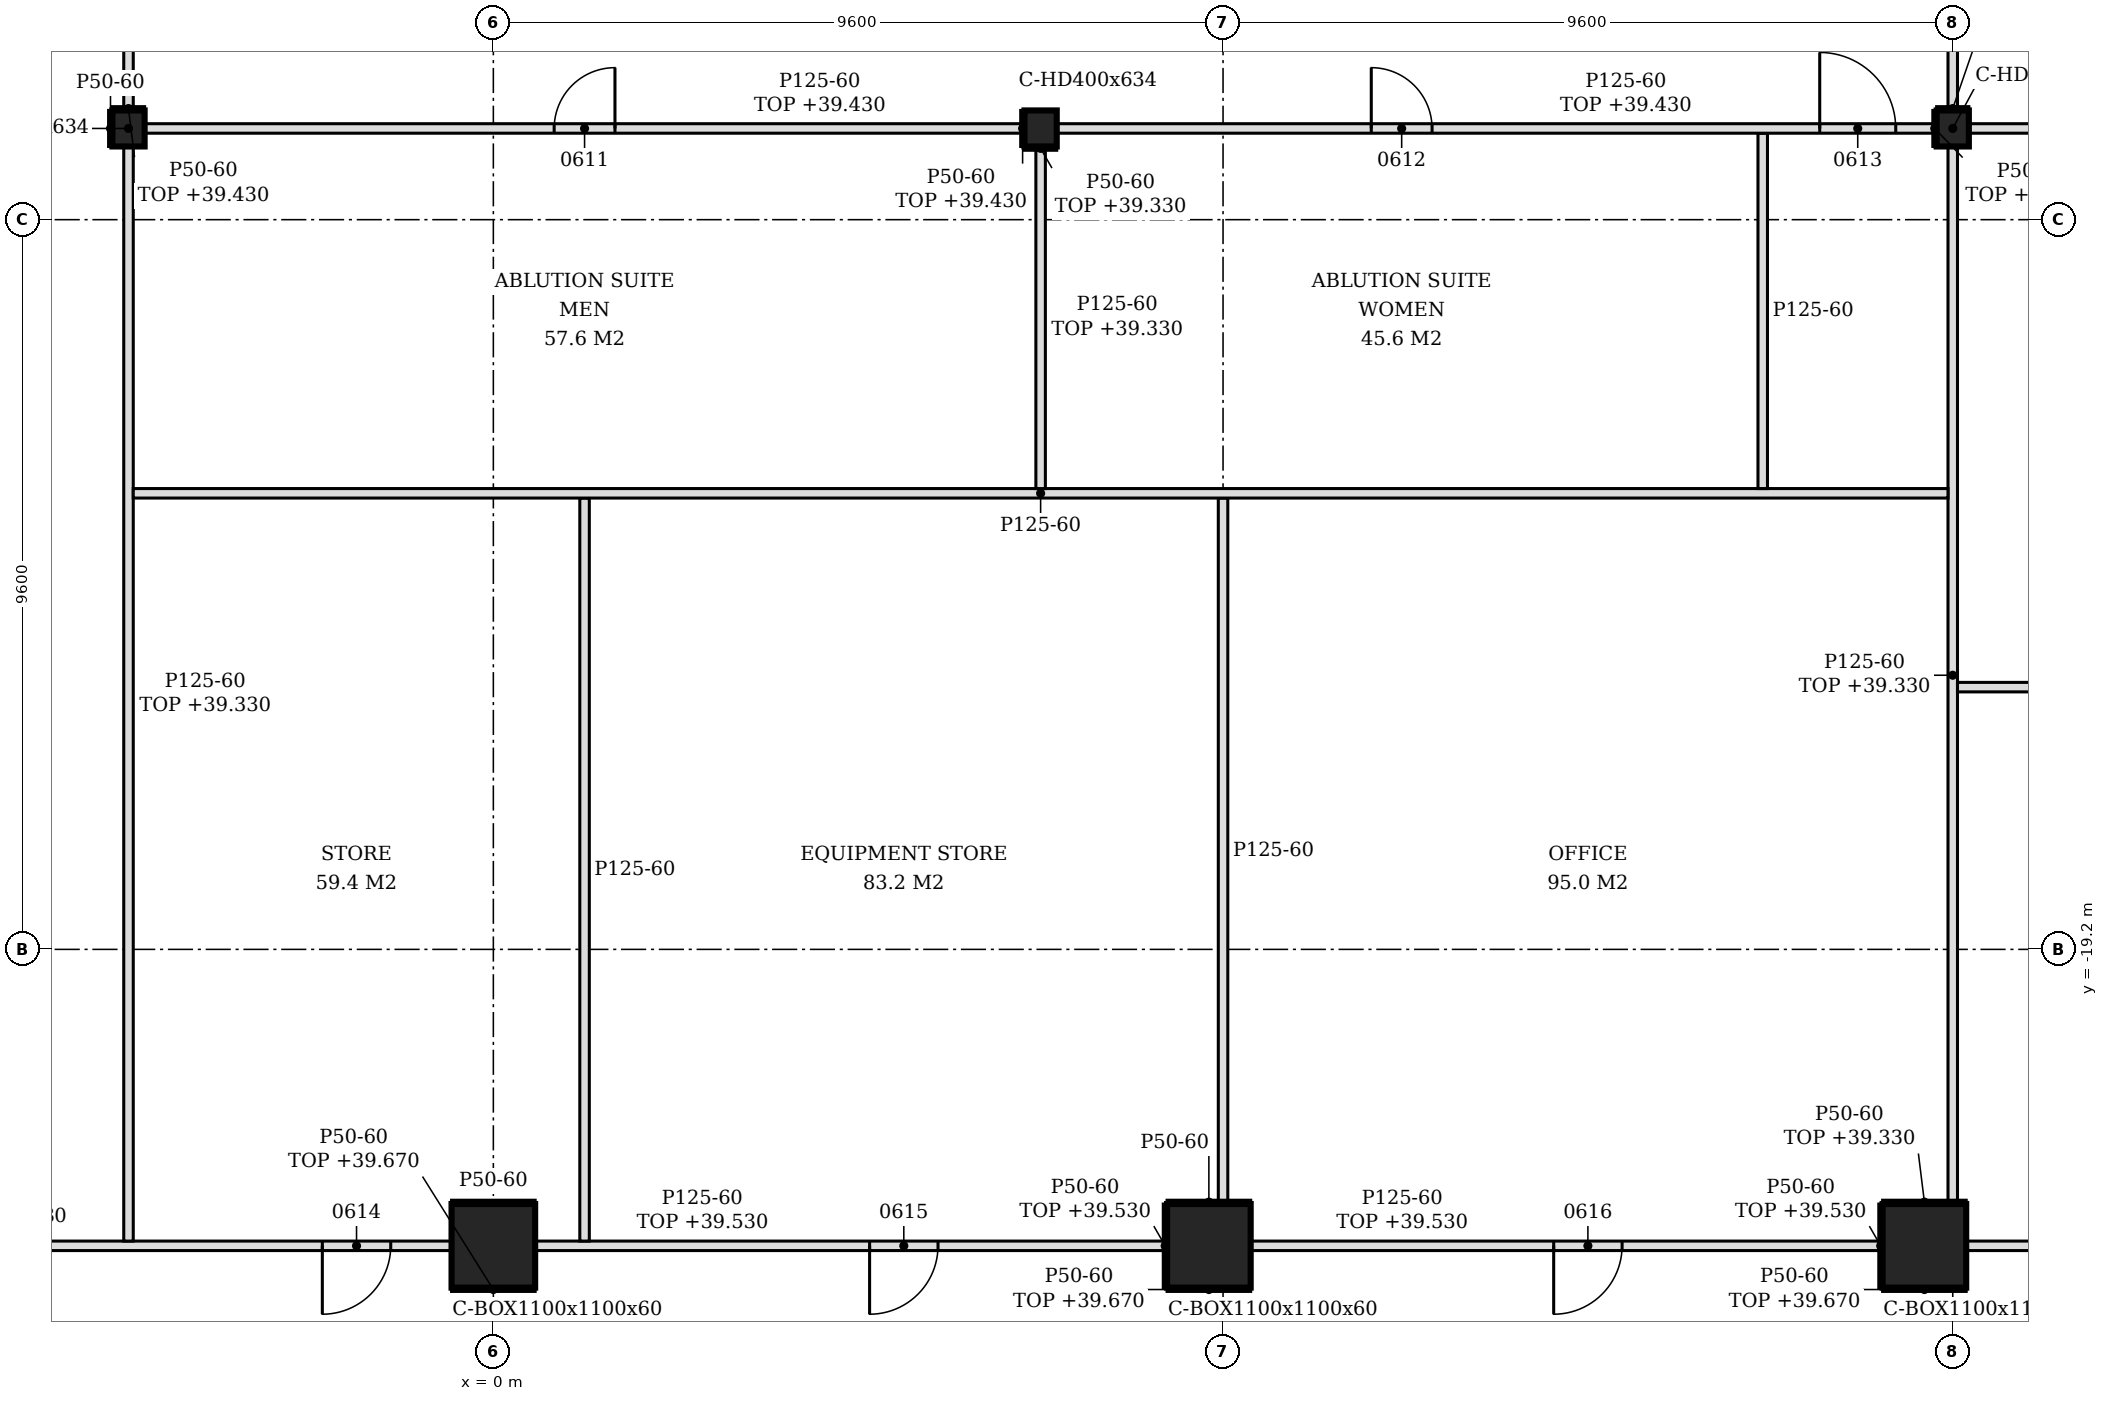
"""IFC4 building model, lengths in metres.
Left out: names, types, materials, properties, quantities, classifications, styles, units other than length and angle.
Written with IfcOpenShell. Run it as: python <this file> out.ifc"""

import sys

from ifc_helpers import new_model, si_unit, direction, frame, frame_2d, origin, origin_2d, place, context, subcontext, project, spatial, polyline, rectangle, hollow_rectangle, i_section, outline, extrude, element, fill, save


model = new_model("IFC4")
c1 = context("Model", 3, precision=1e-05, world=origin(), true_north=direction((0.0, 1.0)))
c2 = subcontext(c1, "Body", "Model", "MODEL_VIEW")
j1 = project(units=[si_unit("LENGTHUNIT", "METRE"), si_unit("PLANEANGLEUNIT", "RADIAN")], contexts=[c1])
p1 = place(None, origin())
s1 = spatial("IfcSite", under=j1, at=p1, CompositionType="ELEMENT")
p2 = place(p1, origin())
s2 = spatial("IfcBuilding", under=s1, at=p2, CompositionType="ELEMENT")
p3 = place(p2, frame((0.0, 0.0, 35.4)))
s3 = spatial("IfcBuildingStorey", under=s2, at=p3, CompositionType="ELEMENT", Elevation=35.4)
for number, where, z_axis, x_axis in (
    (1, (0.0, -23.1, -0.2), (0.0, 0.0, 1.0), (1.0, 0.0, 0.0)),
    (2, (9.414, -23.1, -0.2), (0.0, 0.0, 1.0), (1.0, 0.0, 0.0)),
    (3, (18.827, -23.1, -0.2), (0.0, 0.0, 1.0), (1.0, 0.0, 0.0)),
):
    element("IfcColumn", number, at=place(p3, frame(where, z_axis=z_axis, x_axis=x_axis)), inside=s3, PredefinedType="COLUMN", context=c2, shape_type="SweptSolid", body=[
        extrude(hollow_rectangle(XDim=1.1, YDim=1.1, WallThickness=0.06, at=origin_2d()), origin(), (0.0, 0.0, 1.0), 4.85),
    ])
for number, where, z_axis, x_axis in (
    (4, (-4.8, -8.4, -0.2), (0.0, 0.0, 1.0), (1.0, 0.0, 0.0)),
    (5, (7.2, -8.4, -0.2), (0.0, 0.0, 1.0), (1.0, 0.0, 0.0)),
    (6, (19.2, -8.4, -0.2), (0.0, 0.0, 1.0), (1.0, 0.0, 0.0)),
):
    element("IfcColumn", number, at=place(p3, frame(where, z_axis=z_axis, x_axis=x_axis)), inside=s3, PredefinedType="COLUMN", context=c2, shape_type="SweptSolid", body=[
        extrude(i_section(OverallWidth=0.424, OverallDepth=0.474, WebThickness=0.048, FlangeThickness=0.077, FilletRadius=0.015, at=origin_2d()), origin(), (0.0, 0.0, 1.0), 4.85),
    ])
p4 = place(p3, frame((-8.864, -23.1, 0.0), z_axis=(0.0, 0.0, 1.0), x_axis=(1.0, 0.0, 0.0)))
e7 = element("IfcWall", 7, at=p4, inside=s3, PredefinedType="PARTITIONING", context=c2, shape_type="SweptSolid", body=[
    extrude(rectangle(XDim=8.313, YDim=0.125, at=frame_2d((4.157, 0.0))), origin(), (0.0, 0.0, 1.0), 4.13),
])
p5 = place(p4, frame((6.614, 0.0, 0.0)))
e8 = element("IfcOpeningElement", 8, at=p5, cuts=e7, PredefinedType="OPENING", context=c2, shape_type="SweptSolid", body=[
    extrude(rectangle(XDim=0.9, YDim=2.1, at=frame_2d((0.45, 1.05))), frame((0.0, 0.073, 0.0), z_axis=(0.0, -1.0, 0.0), x_axis=(1.0, 0.0, 0.0)), (0.0, 0.0, 1.0), 0.145),
])
p6 = place(p3, frame((0.55, -23.1, 0.0), z_axis=(0.0, 0.0, 1.0), x_axis=(1.0, 0.0, 0.0)))
e9 = element("IfcWall", 9, at=p6, inside=s3, PredefinedType="PARTITIONING", context=c2, shape_type="SweptSolid", body=[
    extrude(rectangle(XDim=8.313, YDim=0.125, at=frame_2d((4.157, 0.0))), origin(), (0.0, 0.0, 1.0), 4.13),
])
p7 = place(p6, frame((4.4, 0.0, 0.0)))
e10 = element("IfcOpeningElement", 10, at=p7, cuts=e9, PredefinedType="OPENING", context=c2, shape_type="SweptSolid", body=[
    extrude(rectangle(XDim=0.9, YDim=2.1, at=frame_2d((0.45, 1.05))), frame((0.0, 0.073, 0.0), z_axis=(0.0, -1.0, 0.0), x_axis=(1.0, 0.0, 0.0)), (0.0, 0.0, 1.0), 0.145),
])
p8 = place(p3, frame((9.964, -23.1, 0.0), z_axis=(0.0, 0.0, 1.0), x_axis=(1.0, 0.0, 0.0)))
e11 = element("IfcWall", 11, at=p8, inside=s3, PredefinedType="PARTITIONING", context=c2, shape_type="SweptSolid", body=[
    extrude(rectangle(XDim=8.313, YDim=0.125, at=frame_2d((4.157, 0.0))), origin(), (0.0, 0.0, 1.0), 4.13),
])
p9 = place(p8, frame((3.986, 0.0, 0.0)))
e12 = element("IfcOpeningElement", 12, at=p9, cuts=e11, PredefinedType="OPENING", context=c2, shape_type="SweptSolid", body=[
    extrude(rectangle(XDim=0.9, YDim=2.1, at=frame_2d((0.45, 1.05))), frame((0.0, 0.073, 0.0), z_axis=(0.0, -1.0, 0.0), x_axis=(1.0, 0.0, 0.0)), (0.0, 0.0, 1.0), 0.145),
])
p10 = place(p3, frame((19.377, -23.1, 0.0), z_axis=(0.0, 0.0, 1.0), x_axis=(1.0, 0.0, 0.0)))
e13 = element("IfcWall", 13, at=p10, inside=s3, PredefinedType="PARTITIONING", context=c2, shape_type="SweptSolid", body=[
    extrude(rectangle(XDim=8.585, YDim=0.125, at=frame_2d((4.292, 0.0))), origin(), (0.0, 0.0, 1.0), 4.65),
])
p11 = place(p3, frame((-4.8, -23.038, 0.0), z_axis=(0.0, 0.0, 1.0), x_axis=(0.0, 1.0, 0.0)))
e14 = element("IfcWall", 14, at=p11, inside=s3, PredefinedType="PARTITIONING", context=c2, shape_type="SweptSolid", body=[
    extrude(rectangle(XDim=14.401, YDim=0.125, at=frame_2d((7.2, 0.0))), origin(), (0.0, 0.0, 1.0), 3.93),
])
p12 = place(p3, frame((1.2, -23.038, 0.0), z_axis=(0.0, 0.0, 1.0), x_axis=(0.0, 1.0, 0.0)))
e15 = element("IfcWall", 15, at=p12, inside=s3, PredefinedType="PARTITIONING", context=c2, shape_type="SweptSolid", body=[
    extrude(outline(polyline([(0.0, 0.0), (9.775, 0.0), (9.775, 4.65), (8.742, 4.65), (8.74, 4.08), (8.532, 4.08), (8.531, 4.65), (3.942, 4.65), (3.94, 4.08), (3.732, 4.08), (3.73, 4.65), (0.087, 4.65), (0.085, 4.13), (0.0, 4.13), (0.0, 0.0)])), frame((0.0, 0.062, 0.0), z_axis=(0.0, -1.0, 0.0), x_axis=(1.0, 0.0, 0.0)), (0.0, 0.0, 1.0), 0.125),
])
p13 = place(p3, frame((9.6, -22.55, 0.0), z_axis=(0.0, 0.0, 1.0), x_axis=(0.0, 1.0, 0.0)))
e16 = element("IfcWall", 16, at=p13, inside=s3, PredefinedType="PARTITIONING", context=c2, shape_type="SweptSolid", body=[
    extrude(outline(polyline([(0.0, 0.0), (9.288, 0.0), (9.288, 4.65), (8.255, 4.65), (8.253, 4.08), (8.045, 4.08), (8.043, 4.65), (3.455, 4.65), (3.453, 4.08), (3.245, 4.08), (3.243, 4.65), (0.0, 4.65), (0.0, 0.0)])), frame((0.0, 0.062, 0.0), z_axis=(0.0, -1.0, 0.0), x_axis=(1.0, 0.0, 0.0)), (0.0, 0.0, 1.0), 0.125),
])
p14 = place(p3, frame((19.2, -22.55, 0.0), z_axis=(0.0, 0.0, 1.0), x_axis=(0.0, 1.0, 0.0)))
e17 = element("IfcWall", 17, at=p14, inside=s3, PredefinedType="PARTITIONING", context=c2, shape_type="SweptSolid", body=[
    extrude(rectangle(XDim=13.913, YDim=0.125, at=frame_2d((6.957, 0.0))), origin(), (0.0, 0.0, 1.0), 3.93),
])
p15 = place(p3, frame((19.262, -15.75, 0.0), z_axis=(0.0, 0.0, 1.0), x_axis=(1.0, 0.0, 0.0)))
e18 = element("IfcWall", 18, at=p15, inside=s3, PredefinedType="PARTITIONING", context=c2, shape_type="SweptSolid", body=[
    extrude(outline(polyline([(0.0, 0.0), (8.575, 0.0), (8.575, 4.65), (7.189, 4.65), (7.187, 4.13), (6.64, 4.13), (6.638, 4.65), (0.087, 4.65), (0.085, 3.93), (0.0, 3.93), (0.0, 0.0)])), frame((0.0, 0.062, 0.0), z_axis=(0.0, -1.0, 0.0), x_axis=(1.0, 0.0, 0.0)), (0.0, 0.0, 1.0), 0.125),
])
p16 = place(p3, frame((-4.738, -13.2, 0.0), z_axis=(0.0, 0.0, 1.0), x_axis=(1.0, 0.0, 0.0)))
e19 = element("IfcWall", 19, at=p16, inside=s3, PredefinedType="PARTITIONING", context=c2, shape_type="SweptSolid", body=[
    extrude(outline(polyline([(0.0, 0.0), (23.875, 0.0), (23.875, 3.93), (23.788, 3.93), (23.785, 4.65), (12.087, 4.65), (12.085, 3.93), (11.788, 3.93), (11.785, 4.65), (0.087, 4.65), (0.085, 3.93), (0.0, 3.93), (0.0, 0.0)])), frame((0.0, 0.062, 0.0), z_axis=(0.0, -1.0, 0.0), x_axis=(1.0, 0.0, 0.0)), (0.0, 0.0, 1.0), 0.125),
])
p17 = place(p3, frame((7.2, -13.137, 0.0), z_axis=(0.0, 0.0, 1.0), x_axis=(0.0, 1.0, 0.0)))
e20 = element("IfcWall", 20, at=p17, inside=s3, PredefinedType="PARTITIONING", context=c2, shape_type="SweptSolid", body=[
    extrude(rectangle(XDim=4.5, YDim=0.125, at=frame_2d((2.25, 0.0))), origin(), (0.0, 0.0, 1.0), 3.93),
])
p18 = place(p3, frame((16.7, -13.137, 0.0), z_axis=(0.0, 0.0, 1.0), x_axis=(0.0, 1.0, 0.0)))
e21 = element("IfcWall", 21, at=p18, inside=s3, PredefinedType="PARTITIONING", context=c2, shape_type="SweptSolid", body=[
    extrude(outline(polyline([(0.0, 0.0), (4.675, 0.0), (4.675, 4.03), (4.587, 4.03), (4.585, 4.65), (0.0, 4.65), (0.0, 0.0)])), frame((0.0, 0.062, 0.0), z_axis=(0.0, -1.0, 0.0), x_axis=(1.0, 0.0, 0.0)), (0.0, 0.0, 1.0), 0.125),
])
p19 = place(p3, frame((-4.588, -8.4, 0.0), z_axis=(0.0, 0.0, 1.0), x_axis=(1.0, 0.0, 0.0)))
e22 = element("IfcWall", 22, at=p19, inside=s3, PredefinedType="PARTITIONING", context=c2, shape_type="SweptSolid", body=[
    extrude(rectangle(XDim=11.576, YDim=0.125, at=frame_2d((5.788, 0.0))), origin(), (0.0, 0.0, 1.0), 4.03),
])
p20 = place(p19, frame((5.388, 0.0, 0.0)))
e23 = element("IfcOpeningElement", 23, at=p20, cuts=e22, PredefinedType="OPENING", context=c2, shape_type="SweptSolid", body=[
    extrude(rectangle(XDim=0.8, YDim=2.1, at=frame_2d((0.4, 1.05))), frame((0.0, 0.073, 0.0), z_axis=(0.0, -1.0, 0.0), x_axis=(1.0, 0.0, 0.0)), (0.0, 0.0, 1.0), 0.145),
])
p21 = place(p3, frame((7.412, -8.4, 0.0), z_axis=(0.0, 0.0, 1.0), x_axis=(1.0, 0.0, 0.0)))
e24 = element("IfcWall", 24, at=p21, inside=s3, PredefinedType="PARTITIONING", context=c2, shape_type="SweptSolid", body=[
    extrude(rectangle(XDim=11.576, YDim=0.125, at=frame_2d((5.788, 0.0))), origin(), (0.0, 0.0, 1.0), 4.03),
])
p22 = place(p21, frame((4.138, 0.0, 0.0)))
e25 = element("IfcOpeningElement", 25, at=p22, cuts=e24, PredefinedType="OPENING", context=c2, shape_type="SweptSolid", body=[
    extrude(rectangle(XDim=0.8, YDim=2.1, at=frame_2d((0.4, 1.05))), frame((0.0, 0.073, 0.0), z_axis=(0.0, -1.0, 0.0), x_axis=(1.0, 0.0, 0.0)), (0.0, 0.0, 1.0), 0.145),
])
p23 = place(p21, frame((10.038, 0.0, 0.0)))
e26 = element("IfcOpeningElement", 26, at=p23, cuts=e24, PredefinedType="OPENING", context=c2, shape_type="SweptSolid", body=[
    extrude(rectangle(XDim=1.0, YDim=2.1, at=frame_2d((0.5, 1.05))), frame((0.0, 0.073, 0.0), z_axis=(0.0, -1.0, 0.0), x_axis=(1.0, 0.0, 0.0)), (0.0, 0.0, 1.0), 0.145),
])
p24 = place(p3, frame((19.412, -8.4, 0.0), z_axis=(0.0, 0.0, 1.0), x_axis=(1.0, 0.0, 0.0)))
e27 = element("IfcWall", 27, at=p24, inside=s3, PredefinedType="PARTITIONING", context=c2, shape_type="SweptSolid", body=[
    extrude(outline(polyline([(0.0, 0.0), (8.425, 0.0), (8.426, 4.13), (8.338, 4.13), (8.336, 4.65), (0.0, 4.65), (0.0, 0.0)])), frame((0.0, 0.062, 0.0), z_axis=(0.0, -1.0, 0.0), x_axis=(1.0, 0.0, 0.0)), (0.0, 0.0, 1.0), 0.125),
])
for number, where, z_axis, x_axis in (
    (28, (-4.8, -8.163, 0.0), (0.0, 0.0, 1.0), (0.0, 1.0, 0.0)),
    (29, (19.2, -8.163, 0.0), (0.0, 0.0, 1.0), (0.0, 1.0, 0.0)),
):
    element("IfcWall", number, at=place(p3, frame(where, z_axis=z_axis, x_axis=x_axis)), inside=s3, PredefinedType="PARTITIONING", context=c2, shape_type="SweptSolid", body=[
        extrude(rectangle(XDim=10.326, YDim=0.125, at=frame_2d((5.163, 0.0))), origin(), (0.0, 0.0, 1.0), 4.03),
    ])
p25 = place(p3, frame((-0.55, -22.525, 0.0), z_axis=(0.0, 0.0, 1.0), x_axis=(1.0, 0.0, 0.0)))
e30 = element("IfcWall", 30, at=p25, inside=s3, PredefinedType="PARTITIONING", context=c2, shape_type="SweptSolid", body=[
    extrude(rectangle(XDim=1.1, YDim=0.05, at=frame_2d((0.55, 0.0))), origin(), (0.0, 0.0, 1.0), 4.65),
])
p26 = place(p3, frame((-0.55, -23.675, 0.0), z_axis=(0.0, 0.0, 1.0), x_axis=(1.0, 0.0, 0.0)))
e31 = element("IfcWall", 31, at=p26, inside=s3, PredefinedType="PARTITIONING", context=c2, shape_type="SweptSolid", body=[
    extrude(rectangle(XDim=1.1, YDim=0.05, at=frame_2d((0.55, 0.0))), origin(), (0.0, 0.0, 1.0), 4.27),
])
p27 = place(p3, frame((8.864, -22.525, 0.0), z_axis=(0.0, 0.0, 1.0), x_axis=(1.0, 0.0, 0.0)))
e32 = element("IfcWall", 32, at=p27, inside=s3, PredefinedType="PARTITIONING", context=c2, shape_type="SweptSolid", body=[
    extrude(rectangle(XDim=1.1, YDim=0.05, at=frame_2d((0.55, 0.0))), origin(), (0.0, 0.0, 1.0), 4.65),
])
p28 = place(p3, frame((8.864, -23.675, 0.0), z_axis=(0.0, 0.0, 1.0), x_axis=(1.0, 0.0, 0.0)))
e33 = element("IfcWall", 33, at=p28, inside=s3, PredefinedType="PARTITIONING", context=c2, shape_type="SweptSolid", body=[
    extrude(rectangle(XDim=1.1, YDim=0.05, at=frame_2d((0.55, 0.0))), origin(), (0.0, 0.0, 1.0), 4.27),
])
p29 = place(p3, frame((18.277, -22.525, 0.0), z_axis=(0.0, 0.0, 1.0), x_axis=(1.0, 0.0, 0.0)))
e34 = element("IfcWall", 34, at=p29, inside=s3, PredefinedType="PARTITIONING", context=c2, shape_type="SweptSolid", body=[
    extrude(rectangle(XDim=1.1, YDim=0.05, at=frame_2d((0.55, 0.0))), origin(), (0.0, 0.0, 1.0), 3.93),
])
p30 = place(p3, frame((18.277, -23.675, 0.0), z_axis=(0.0, 0.0, 1.0), x_axis=(1.0, 0.0, 0.0)))
e35 = element("IfcWall", 35, at=p30, inside=s3, PredefinedType="PARTITIONING", context=c2, shape_type="SweptSolid", body=[
    extrude(rectangle(XDim=1.1, YDim=0.05, at=frame_2d((0.55, 0.0))), origin(), (0.0, 0.0, 1.0), 4.27),
])
p31 = place(p3, frame((-5.037, -8.637, 0.0), z_axis=(0.0, 0.0, 1.0), x_axis=(0.0, 1.0, 0.0)))
e36 = element("IfcWall", 36, at=p31, inside=s3, PredefinedType="PARTITIONING", context=c2, shape_type="SweptSolid", body=[
    extrude(rectangle(XDim=0.474, YDim=0.05, at=frame_2d((0.237, 0.0))), origin(), (0.0, 0.0, 1.0), 4.65),
])
for number, where, z_axis, x_axis in (
    (37, (8.839, -23.65, 0.0), (0.0, 0.0, 1.0), (0.0, 1.0, 0.0)),
    (38, (18.252, -23.65, 0.0), (0.0, 0.0, 1.0), (0.0, 1.0, 0.0)),
):
    element("IfcWall", number, at=place(p3, frame(where, z_axis=z_axis, x_axis=x_axis)), inside=s3, PredefinedType="PARTITIONING", context=c2, shape_type="SweptSolid", body=[
        extrude(rectangle(XDim=1.1, YDim=0.05, at=frame_2d((0.55, 0.0))), origin(), (0.0, 0.0, 1.0), 4.13),
    ])
for number, where, z_axis, x_axis in (
    (39, (18.963, -8.637, 0.0), (0.0, 0.0, 1.0), (0.0, 1.0, 0.0)),
    (40, (6.963, -8.637, 0.0), (0.0, 0.0, 1.0), (0.0, 1.0, 0.0)),
):
    element("IfcWall", number, at=place(p3, frame(where, z_axis=z_axis, x_axis=x_axis)), inside=s3, PredefinedType="PARTITIONING", context=c2, shape_type="SweptSolid", body=[
        extrude(rectangle(XDim=0.474, YDim=0.05, at=frame_2d((0.237, 0.0))), origin(), (0.0, 0.0, 1.0), 4.03),
    ])
p32 = place(p3, frame((-5.012, -8.138, 0.0), z_axis=(0.0, 0.0, 1.0), x_axis=(1.0, 0.0, 0.0)))
e41 = element("IfcWall", 41, at=p32, inside=s3, PredefinedType="PARTITIONING", context=c2, shape_type="SweptSolid", body=[
    extrude(rectangle(XDim=0.424, YDim=0.05, at=frame_2d((0.212, 0.0))), origin(), (0.0, 0.0, 1.0), 4.03),
])
p33 = place(p3, frame((6.988, -8.662, 0.0), z_axis=(0.0, 0.0, 1.0), x_axis=(1.0, 0.0, 0.0)))
e42 = element("IfcWall", 42, at=p33, inside=s3, PredefinedType="PARTITIONING", context=c2, shape_type="SweptSolid", body=[
    extrude(rectangle(XDim=0.424, YDim=0.05, at=frame_2d((0.212, 0.0))), origin(), (0.0, 0.0, 1.0), 3.93),
])
p34 = place(p3, frame((18.988, -8.138, 0.0), z_axis=(0.0, 0.0, 1.0), x_axis=(1.0, 0.0, 0.0)))
e43 = element("IfcWall", 43, at=p34, inside=s3, PredefinedType="PARTITIONING", context=c2, shape_type="SweptSolid", body=[
    extrude(rectangle(XDim=0.424, YDim=0.05, at=frame_2d((0.212, 0.0))), origin(), (0.0, 0.0, 1.0), 4.03),
])
p35 = place(p20, origin())
e44 = element("IfcDoor", 44, at=p35, inside=s3, OperationType="SINGLE_SWING_RIGHT", PredefinedType="DOOR", context=c2, shape_type="SweptSolid", body=[
    extrude(rectangle(XDim=0.8, YDim=2.1, at=frame_2d((0.4, 1.05))), frame((0.0, 0.025, 0.0), z_axis=(0.0, -1.0, 0.0), x_axis=(1.0, 0.0, 0.0)), (0.0, 0.0, 1.0), 0.05),
])
fill(e23, e44)
p36 = place(p22, origin())
e45 = element("IfcDoor", 45, at=p36, inside=s3, OperationType="SINGLE_SWING_LEFT", PredefinedType="DOOR", context=c2, shape_type="SweptSolid", body=[
    extrude(rectangle(XDim=0.8, YDim=2.1, at=frame_2d((0.4, 1.05))), frame((0.0, 0.025, 0.0), z_axis=(0.0, -1.0, 0.0), x_axis=(1.0, 0.0, 0.0)), (0.0, 0.0, 1.0), 0.05),
])
fill(e25, e45)
p37 = place(p23, origin())
e46 = element("IfcDoor", 46, at=p37, inside=s3, OperationType="SINGLE_SWING_LEFT", PredefinedType="DOOR", context=c2, shape_type="SweptSolid", body=[
    extrude(rectangle(XDim=1.0, YDim=2.1, at=frame_2d((0.5, 1.05))), frame((0.0, 0.025, 0.0), z_axis=(0.0, -1.0, 0.0), x_axis=(1.0, 0.0, 0.0)), (0.0, 0.0, 1.0), 0.05),
])
fill(e26, e46)
p38 = place(p5, frame((0.9, 0.0, 0.0), z_axis=(0.0, 0.0, 1.0), x_axis=(-1.0, 0.0, 0.0)))
e47 = element("IfcDoor", 47, at=p38, inside=s3, OperationType="SINGLE_SWING_RIGHT", PredefinedType="DOOR", context=c2, shape_type="SweptSolid", body=[
    extrude(rectangle(XDim=0.9, YDim=2.1, at=frame_2d((0.45, 1.05))), frame((0.0, 0.025, 0.0), z_axis=(0.0, -1.0, 0.0), x_axis=(1.0, 0.0, 0.0)), (0.0, 0.0, 1.0), 0.05),
])
fill(e8, e47)
p39 = place(p7, frame((0.9, 0.0, 0.0), z_axis=(0.0, 0.0, 1.0), x_axis=(-1.0, 0.0, 0.0)))
e48 = element("IfcDoor", 48, at=p39, inside=s3, OperationType="SINGLE_SWING_RIGHT", PredefinedType="DOOR", context=c2, shape_type="SweptSolid", body=[
    extrude(rectangle(XDim=0.9, YDim=2.1, at=frame_2d((0.45, 1.05))), frame((0.0, 0.025, 0.0), z_axis=(0.0, -1.0, 0.0), x_axis=(1.0, 0.0, 0.0)), (0.0, 0.0, 1.0), 0.05),
])
fill(e10, e48)
p40 = place(p9, frame((0.9, 0.0, 0.0), z_axis=(0.0, 0.0, 1.0), x_axis=(-1.0, 0.0, 0.0)))
e49 = element("IfcDoor", 49, at=p40, inside=s3, OperationType="SINGLE_SWING_RIGHT", PredefinedType="DOOR", context=c2, shape_type="SweptSolid", body=[
    extrude(rectangle(XDim=0.9, YDim=2.1, at=frame_2d((0.45, 1.05))), frame((0.0, 0.025, 0.0), z_axis=(0.0, -1.0, 0.0), x_axis=(1.0, 0.0, 0.0)), (0.0, 0.0, 1.0), 0.05),
])
fill(e12, e49)
save(model, sys.argv[1])
